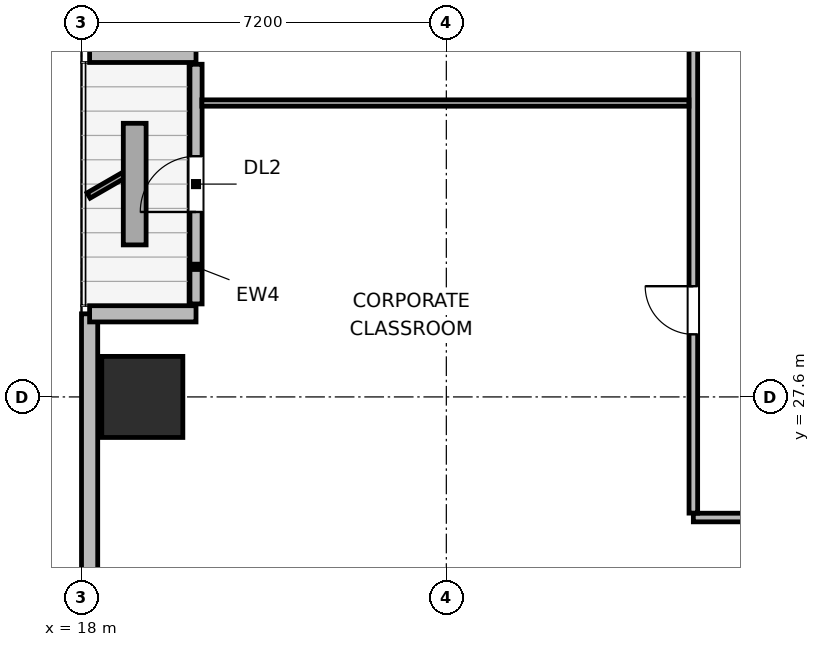
"""IFC4 building model, lengths in metres.
Left out: names, types, materials, properties, quantities, classifications, styles, units other than length and angle.
Written with IfcOpenShell. Run it as: python <this file> out.ifc"""

import sys

from ifc_helpers import new_model, si_unit, direction, frame, frame_2d, origin, origin_2d, place, context, subcontext, project, spatial, rectangle, extrude, element, fill, save


model = new_model("IFC4")
c1 = context("Model", 3, precision=1e-05, world=origin(), true_north=direction((0.0, 1.0)))
c2 = subcontext(c1, "Body", "Model", "MODEL_VIEW")
j1 = project(units=[si_unit("LENGTHUNIT", "METRE"), si_unit("PLANEANGLEUNIT", "RADIAN")], contexts=[c1])
p1 = place(None, origin())
s1 = spatial("IfcSite", under=j1, at=p1, CompositionType="ELEMENT")
p2 = place(p1, origin())
s2 = spatial("IfcBuilding", under=s1, at=p2, CompositionType="ELEMENT")
p3 = place(p2, frame((0.0, 0.0, 37.2)))
s3 = spatial("IfcBuildingStorey", under=s2, at=p3, CompositionType="ELEMENT", Elevation=37.2)
p4 = place(p3, frame((19.2, 27.6, 0.0), z_axis=(0.0, 0.0, 1.0), x_axis=(1.0, 0.0, 0.0)))
e1 = element("IfcColumn", 1, at=p4, inside=s3, PredefinedType="COLUMN", context=c2, shape_type="SweptSolid", body=[
    extrude(rectangle(XDim=1.6, YDim=1.6, at=origin_2d()), origin(), (0.0, 0.0, 1.0), 3.9),
])
p5 = place(p3, frame((18.16, 15.021, 0.0), z_axis=(0.0, 0.0, 1.0), x_axis=(0.0, 1.0, 0.0)))
e2 = element("IfcWall", 2, at=p5, inside=s3, PredefinedType="SOLIDWALL", context=c2, shape_type="SweptSolid", body=[
    extrude(rectangle(XDim=14.219, YDim=0.32, at=frame_2d((7.109, 0.0))), origin(), (0.0, 0.0, 1.0), 3.64),
])
p6 = place(p3, frame((18.16, 29.24, 0.0), z_axis=(0.0, 0.0, 1.0), x_axis=(1.0, 0.0, 0.0)))
e3 = element("IfcWall", 3, at=p6, inside=s3, PredefinedType="SOLIDWALL", context=c2, shape_type="SweptSolid", body=[
    extrude(rectangle(XDim=2.1, YDim=0.32, at=frame_2d((1.05, 0.0))), origin(), (0.0, 0.0, 1.0), 2.875),
])
p7 = place(p3, frame((20.26, 29.435, 0.0), z_axis=(0.0, 0.0, 1.0), x_axis=(0.0, 1.0, 0.0)))
e4 = element("IfcWall", 4, at=p7, inside=s3, PredefinedType="SOLIDWALL", context=c2, shape_type="SweptSolid", body=[
    extrude(rectangle(XDim=4.73, YDim=0.24, at=frame_2d((2.365, 0.0))), origin(), (0.0, 0.0, 1.0), 3.162),
])
p8 = place(p7, frame((1.815, 0.0, 0.0)))
e5 = element("IfcOpeningElement", 5, at=p8, cuts=e4, PredefinedType="OPENING", context=c2, shape_type="SweptSolid", body=[
    extrude(rectangle(XDim=1.1, YDim=2.04, at=frame_2d((0.55, 1.02))), frame((0.0, 0.13, 0.0), z_axis=(0.0, -1.0, 0.0), x_axis=(1.0, 0.0, 0.0)), (0.0, 0.0, 1.0), 0.26),
])
p9 = place(p3, frame((20.26, 34.36, 0.0), z_axis=(0.0, 0.0, 1.0), x_axis=(-1.0, 0.0, 0.0)))
e6 = element("IfcWall", 6, at=p9, inside=s3, PredefinedType="SOLIDWALL", context=c2, shape_type="SweptSolid", body=[
    extrude(rectangle(XDim=2.1, YDim=0.32, at=frame_2d((1.05, 0.0))), origin(), (0.0, 0.0, 1.0), 2.875),
])
p10 = place(p3, frame((30.075, 25.22, 0.0), z_axis=(0.0, 0.0, 1.0), x_axis=(1.0, 0.0, 0.0)))
e7 = element("IfcWall", 7, at=p10, inside=s3, PredefinedType="PARTITIONING", context=c2, shape_type="SweptSolid", body=[
    extrude(rectangle(XDim=35.85, YDim=0.17, at=frame_2d((17.925, 0.0))), origin(), (0.0, 0.0, 1.0), 3.64),
])
p11 = place(p10, frame((4.308, 0.0, 0.0)))
e8 = element("IfcOpeningElement", 8, at=p11, cuts=e7, PredefinedType="OPENING", context=c2, shape_type="SweptSolid", body=[
    extrude(rectangle(XDim=0.95, YDim=2.04, at=frame_2d((0.475, 1.02))), frame((0.0, 0.095, 0.0), z_axis=(0.0, -1.0, 0.0), x_axis=(1.0, 0.0, 0.0)), (0.0, 0.0, 1.0), 0.19),
])
p12 = place(p10, frame((13.27, 0.0, 0.0)))
e9 = element("IfcOpeningElement", 9, at=p12, cuts=e7, PredefinedType="OPENING", context=c2, shape_type="SweptSolid", body=[
    extrude(rectangle(XDim=0.95, YDim=2.04, at=frame_2d((0.475, 1.02))), frame((0.0, 0.095, 0.0), z_axis=(0.0, -1.0, 0.0), x_axis=(1.0, 0.0, 0.0)), (0.0, 0.0, 1.0), 0.19),
])
p13 = place(p10, frame((21.63, 0.0, 0.0)))
e10 = element("IfcOpeningElement", 10, at=p13, cuts=e7, PredefinedType="OPENING", context=c2, shape_type="SweptSolid", body=[
    extrude(rectangle(XDim=0.95, YDim=2.04, at=frame_2d((0.475, 1.02))), frame((0.0, 0.095, 0.0), z_axis=(0.0, -1.0, 0.0), x_axis=(1.0, 0.0, 0.0)), (0.0, 0.0, 1.0), 0.19),
])
p14 = place(p10, frame((30.592, 0.0, 0.0)))
e11 = element("IfcOpeningElement", 11, at=p14, cuts=e7, PredefinedType="OPENING", context=c2, shape_type="SweptSolid", body=[
    extrude(rectangle(XDim=0.95, YDim=2.04, at=frame_2d((0.475, 1.02))), frame((0.0, 0.095, 0.0), z_axis=(0.0, -1.0, 0.0), x_axis=(1.0, 0.0, 0.0)), (0.0, 0.0, 1.0), 0.19),
])
p15 = place(p3, frame((30.075, 25.307, 0.0), z_axis=(0.0, 0.0, 1.0), x_axis=(0.0, 1.0, 0.0)))
e12 = element("IfcWall", 12, at=p15, inside=s3, PredefinedType="PARTITIONING", context=c2, shape_type="SweptSolid", body=[
    extrude(rectangle(XDim=21.386, YDim=0.17, at=frame_2d((10.693, 0.0))), origin(), (0.0, 0.0, 1.0), 3.64),
])
p16 = place(p15, frame((3.528, 0.0, 0.0)))
e13 = element("IfcOpeningElement", 13, at=p16, cuts=e12, PredefinedType="OPENING", context=c2, shape_type="SweptSolid", body=[
    extrude(rectangle(XDim=0.95, YDim=2.04, at=frame_2d((0.475, 1.02))), frame((0.0, 0.095, 0.0), z_axis=(0.0, -1.0, 0.0), x_axis=(1.0, 0.0, 0.0)), (0.0, 0.0, 1.0), 0.19),
])
p17 = place(p15, frame((10.818, 0.0, 0.0)))
e14 = element("IfcOpeningElement", 14, at=p17, cuts=e12, PredefinedType="OPENING", context=c2, shape_type="SweptSolid", body=[
    extrude(rectangle(XDim=0.95, YDim=2.04, at=frame_2d((0.475, 1.02))), frame((0.0, 0.095, 0.0), z_axis=(0.0, -1.0, 0.0), x_axis=(1.0, 0.0, 0.0)), (0.0, 0.0, 1.0), 0.19),
])
p18 = place(p15, frame((17.508, 0.0, 0.0)))
e15 = element("IfcOpeningElement", 15, at=p18, cuts=e12, PredefinedType="OPENING", context=c2, shape_type="SweptSolid", body=[
    extrude(rectangle(XDim=0.95, YDim=2.04, at=frame_2d((0.475, 1.02))), frame((0.0, 0.095, 0.0), z_axis=(0.0, -1.0, 0.0), x_axis=(1.0, 0.0, 0.0)), (0.0, 0.0, 1.0), 0.19),
])
p19 = place(p3, frame((20.375, 33.4, 0.0), z_axis=(0.0, 0.0, 1.0), x_axis=(1.0, 0.0, 0.0)))
e16 = element("IfcWall", 16, at=p19, inside=s3, PredefinedType="PARTITIONING", context=c2, shape_type="SweptSolid", body=[
    extrude(rectangle(XDim=9.613, YDim=0.125, at=frame_2d((4.807, 0.0))), origin(), (0.0, 0.0, 1.0), 3.64),
])
p20 = place(p8, origin())
e17 = element("IfcDoor", 17, at=p20, inside=s3, OperationType="SINGLE_SWING_LEFT", PredefinedType="DOOR", context=c2, shape_type="SweptSolid", body=[
    extrude(rectangle(XDim=1.1, YDim=2.04, at=frame_2d((0.55, 1.02))), frame((0.0, 0.025, 0.0), z_axis=(0.0, -1.0, 0.0), x_axis=(1.0, 0.0, 0.0)), (0.0, 0.0, 1.0), 0.05),
])
fill(e5, e17)
p21 = place(p16, origin())
e18 = element("IfcDoor", 18, at=p21, inside=s3, OperationType="SINGLE_SWING_RIGHT", PredefinedType="DOOR", context=c2, shape_type="SweptSolid", body=[
    extrude(rectangle(XDim=0.95, YDim=2.04, at=frame_2d((0.475, 1.02))), frame((0.0, 0.025, 0.0), z_axis=(0.0, -1.0, 0.0), x_axis=(1.0, 0.0, 0.0)), (0.0, 0.0, 1.0), 0.05),
])
fill(e13, e18)
save(model, sys.argv[1])
